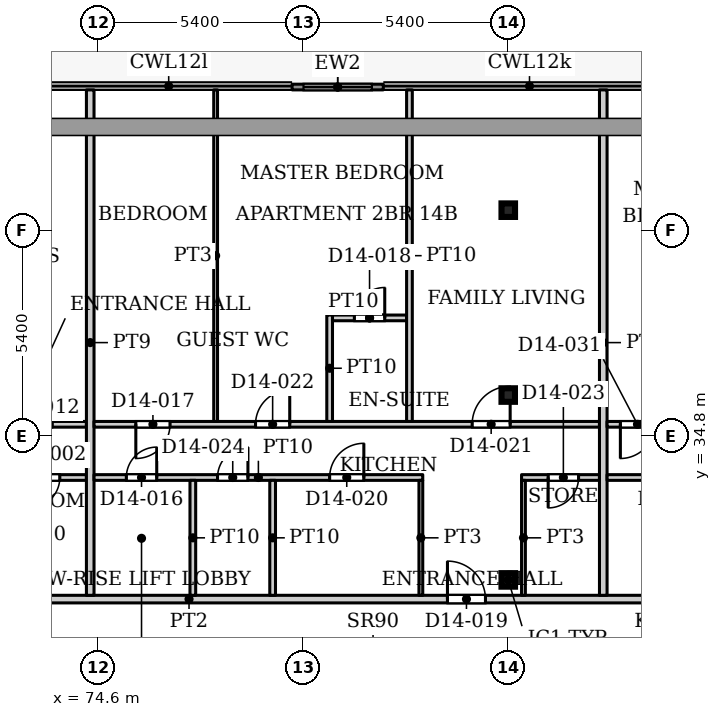
"""IFC4 building model, lengths in metres.
Left out: names, types, materials, properties, quantities, classifications, styles, units other than length and angle.
Written with IfcOpenShell. Run it as: python <this file> out.ifc"""

import sys

from ifc_helpers import new_model, si_unit, direction, frame, frame_2d, origin, origin_2d, place, context, subcontext, project, spatial, rectangle, hollow_rectangle, extrude, source, transform, mapped, element, fill, save


model = new_model("IFC4")
c1 = context("Model", 3, precision=1e-05, world=origin(), true_north=direction((0.0, 1.0)))
c2 = subcontext(c1, "Body", "Model", "MODEL_VIEW")
j1 = project(units=[si_unit("LENGTHUNIT", "METRE"), si_unit("PLANEANGLEUNIT", "RADIAN")], contexts=[c1])
p1 = place(None, origin())
s1 = spatial("IfcSite", under=j1, at=p1, CompositionType="ELEMENT")
p2 = place(p1, origin())
s2 = spatial("IfcBuilding", under=s1, at=p2, CompositionType="ELEMENT")
p3 = place(p2, frame((0.0, 0.0, 61.7)))
s3 = spatial("IfcBuildingStorey", under=s2, at=p3, CompositionType="ELEMENT", Elevation=61.7)
for number, where, z_axis, x_axis in (
    (1, (85.4, 31.005, 0.0), (0.0, 0.0, 1.0), (1.0, 0.0, 0.0)),
    (2, (85.4, 35.87, 0.0), (0.0, 0.0, 1.0), (1.0, 0.0, 0.0)),
    (3, (85.4, 40.735, 0.0), (0.0, 0.0, 1.0), (1.0, 0.0, 0.0)),
):
    element("IfcColumn", number, at=place(p3, frame(where, z_axis=z_axis, x_axis=x_axis)), inside=s3, PredefinedType="COLUMN", context=c2, shape_type="SweptSolid", body=[
        extrude(hollow_rectangle(XDim=0.356, YDim=0.356, WallThickness=0.016, InnerFilletRadius=0.016, OuterFilletRadius=0.032, at=origin_2d()), origin(), (0.0, 0.0, 1.0), 3.9),
    ])
p4 = place(p3, frame((79.712, 43.975, 0.0), z_axis=(0.0, 0.0, 1.0), x_axis=(1.0, 0.0, 0.0)))
e4 = element("IfcWall", 4, at=p4, inside=s3, PredefinedType="SOLIDWALL", context=c2, shape_type="SweptSolid", body=[
    extrude(rectangle(XDim=2.4, YDim=0.15, at=frame_2d((1.2, 0.0))), origin(), (0.0, 0.0, 1.0), 3.75),
])
p5 = place(p4, frame((0.3, 0.0, 0.0)))
e5 = element("IfcOpeningElement", 5, at=p5, cuts=e4, PredefinedType="OPENING", context=c2, shape_type="SweptSolid", body=[
    extrude(rectangle(XDim=1.8, YDim=2.4, at=frame_2d((0.9, 1.2))), frame((0.0, 0.085, 0.0), z_axis=(0.0, -1.0, 0.0), x_axis=(1.0, 0.0, 0.0)), (0.0, 0.0, 1.0), 0.17),
])
p6 = place(p3, frame((55.9, 30.5, 0.0), z_axis=(0.0, 0.0, 1.0), x_axis=(1.0, 0.0, 0.0)))
e6 = element("IfcWall", 6, at=p6, inside=s3, PredefinedType="PARTITIONING", context=c2, shape_type="SweptSolid", body=[
    extrude(rectangle(XDim=42.2, YDim=0.2, at=frame_2d((21.1, 0.0))), origin(), (0.0, 0.0, 1.0), 3.6),
])
p7 = place(p6, frame((14.7, 0.0, 0.0)))
e7 = element("IfcOpeningElement", 7, at=p7, cuts=e6, PredefinedType="OPENING", context=c2, shape_type="SweptSolid", body=[
    extrude(rectangle(XDim=1.0, YDim=2.1, at=frame_2d((0.5, 1.05))), frame((0.0, 0.11, 0.0), z_axis=(0.0, -1.0, 0.0), x_axis=(1.0, 0.0, 0.0)), (0.0, 0.0, 1.0), 0.22),
])
p8 = place(p6, frame((27.9, 0.0, 0.0)))
e8 = element("IfcOpeningElement", 8, at=p8, cuts=e6, PredefinedType="OPENING", context=c2, shape_type="SweptSolid", body=[
    extrude(rectangle(XDim=1.0, YDim=2.1, at=frame_2d((0.5, 1.05))), frame((0.0, 0.11, 0.0), z_axis=(0.0, -1.0, 0.0), x_axis=(1.0, 0.0, 0.0)), (0.0, 0.0, 1.0), 0.22),
])
p9 = place(p6, frame((39.0, 0.0, 0.0)))
e9 = element("IfcOpeningElement", 9, at=p9, cuts=e6, PredefinedType="OPENING", context=c2, shape_type="SweptSolid", body=[
    extrude(rectangle(XDim=1.0, YDim=2.1, at=frame_2d((0.5, 1.05))), frame((0.0, 0.11, 0.0), z_axis=(0.0, -1.0, 0.0), x_axis=(1.0, 0.0, 0.0)), (0.0, 0.0, 1.0), 0.22),
])
p10 = place(p3, frame((55.9, 35.1, 0.0), z_axis=(0.0, 0.0, 1.0), x_axis=(1.0, 0.0, 0.0)))
e10 = element("IfcWall", 10, at=p10, inside=s3, PredefinedType="PARTITIONING", context=c2, shape_type="SweptSolid", body=[
    extrude(rectangle(XDim=18.4, YDim=0.15, at=frame_2d((9.2, 0.0))), origin(), (0.0, 0.0, 1.0), 3.6),
])
p11 = place(p10, frame((1.25, 0.0, 0.0)))
e11 = element("IfcOpeningElement", 11, at=p11, cuts=e10, PredefinedType="OPENING", context=c2, shape_type="SweptSolid", body=[
    extrude(rectangle(XDim=0.9, YDim=2.1, at=frame_2d((0.45, 1.05))), frame((0.0, 0.085, 0.0), z_axis=(0.0, -1.0, 0.0), x_axis=(1.0, 0.0, 0.0)), (0.0, 0.0, 1.0), 0.17),
])
p12 = place(p10, frame((9.2, 0.0, 0.0)))
e12 = element("IfcOpeningElement", 12, at=p12, cuts=e10, PredefinedType="OPENING", context=c2, shape_type="SweptSolid", body=[
    extrude(rectangle(XDim=0.9, YDim=2.1, at=frame_2d((0.45, 1.05))), frame((0.0, 0.085, 0.0), z_axis=(0.0, -1.0, 0.0), x_axis=(1.0, 0.0, 0.0)), (0.0, 0.0, 1.0), 0.17),
])
p13 = place(p10, frame((12.35, 0.0, 0.0)))
e13 = element("IfcOpeningElement", 13, at=p13, cuts=e10, PredefinedType="OPENING", context=c2, shape_type="SweptSolid", body=[
    extrude(rectangle(XDim=1.0, YDim=2.1, at=frame_2d((0.5, 1.05))), frame((0.0, 0.085, 0.0), z_axis=(0.0, -1.0, 0.0), x_axis=(1.0, 0.0, 0.0)), (0.0, 0.0, 1.0), 0.17),
])
p14 = place(p10, frame((15.9, 0.0, 0.0)))
e14 = element("IfcOpeningElement", 14, at=p14, cuts=e10, PredefinedType="OPENING", context=c2, shape_type="SweptSolid", body=[
    extrude(rectangle(XDim=1.6, YDim=2.1, at=frame_2d((0.8, 1.05))), frame((0.0, 0.085, 0.0), z_axis=(0.0, -1.0, 0.0), x_axis=(1.0, 0.0, 0.0)), (0.0, 0.0, 1.0), 0.17),
])
p15 = place(p10, frame((4.4, 0.0, 0.0)))
e15 = element("IfcOpeningElement", 15, at=p15, cuts=e10, PredefinedType="OPENING", context=c2, shape_type="SweptSolid", body=[
    extrude(rectangle(XDim=0.9, YDim=2.1, at=frame_2d((0.45, 1.05))), frame((0.0, 0.085, 0.0), z_axis=(0.0, -1.0, 0.0), x_axis=(1.0, 0.0, 0.0)), (0.0, 0.0, 1.0), 0.17),
])
p16 = place(p3, frame((72.075, 33.7, 0.0), z_axis=(0.0, 0.0, 1.0), x_axis=(1.0, 0.0, 0.0)))
e16 = element("IfcWall", 16, at=p16, inside=s3, PredefinedType="PARTITIONING", context=c2, shape_type="SweptSolid", body=[
    extrude(rectangle(XDim=2.225, YDim=0.15, at=frame_2d((1.113, 0.0))), origin(), (0.0, 0.0, 1.0), 3.6),
])
p17 = place(p16, frame((0.725, 0.0, 0.0)))
e17 = element("IfcOpeningElement", 17, at=p17, cuts=e16, PredefinedType="OPENING", context=c2, shape_type="SweptSolid", body=[
    extrude(rectangle(XDim=0.8, YDim=2.1, at=frame_2d((0.4, 1.05))), frame((0.0, 0.085, 0.0), z_axis=(0.0, -1.0, 0.0), x_axis=(1.0, 0.0, 0.0)), (0.0, 0.0, 1.0), 0.17),
])
p18 = place(p3, frame((74.4, 30.6, 0.0), z_axis=(0.0, 0.0, 1.0), x_axis=(0.0, 1.0, 0.0)))
e18 = element("IfcWall", 18, at=p18, inside=s3, PredefinedType="PARTITIONING", context=c2, shape_type="SweptSolid", body=[
    extrude(rectangle(XDim=13.3, YDim=0.2, at=frame_2d((6.65, 0.0))), origin(), (0.0, 0.0, 1.0), 3.6),
])
p19 = place(p3, frame((74.5, 33.7, 0.0), z_axis=(0.0, 0.0, 1.0), x_axis=(1.0, 0.0, 0.0)))
e19 = element("IfcWall", 19, at=p19, inside=s3, PredefinedType="PARTITIONING", context=c2, shape_type="SweptSolid", body=[
    extrude(rectangle(XDim=8.65, YDim=0.15, at=frame_2d((4.325, 0.0))), origin(), (0.0, 0.0, 1.0), 3.6),
])
p20 = place(p19, frame((0.85, 0.0, 0.0)))
e20 = element("IfcOpeningElement", 20, at=p20, cuts=e19, PredefinedType="OPENING", context=c2, shape_type="SweptSolid", body=[
    extrude(rectangle(XDim=0.8, YDim=2.1, at=frame_2d((0.4, 1.05))), frame((0.0, 0.085, 0.0), z_axis=(0.0, -1.0, 0.0), x_axis=(1.0, 0.0, 0.0)), (0.0, 0.0, 1.0), 0.17),
])
p21 = place(p19, frame((6.2, 0.0, 0.0)))
e21 = element("IfcOpeningElement", 21, at=p21, cuts=e19, PredefinedType="OPENING", context=c2, shape_type="SweptSolid", body=[
    extrude(rectangle(XDim=0.9, YDim=2.1, at=frame_2d((0.45, 1.05))), frame((0.0, 0.085, 0.0), z_axis=(0.0, -1.0, 0.0), x_axis=(1.0, 0.0, 0.0)), (0.0, 0.0, 1.0), 0.17),
])
p22 = place(p19, frame((3.25, 0.0, 0.0)))
e22 = element("IfcOpeningElement", 22, at=p22, cuts=e19, PredefinedType="OPENING", context=c2, shape_type="SweptSolid", body=[
    extrude(rectangle(XDim=0.8, YDim=2.1, at=frame_2d((0.4, 1.05))), frame((0.0, 0.085, 0.0), z_axis=(0.0, -1.0, 0.0), x_axis=(1.0, 0.0, 0.0)), (0.0, 0.0, 1.0), 0.17),
])
p23 = place(p3, frame((74.5, 35.1, 0.0), z_axis=(0.0, 0.0, 1.0), x_axis=(1.0, 0.0, 0.0)))
e23 = element("IfcWall", 23, at=p23, inside=s3, PredefinedType="PARTITIONING", context=c2, shape_type="SweptSolid", body=[
    extrude(rectangle(XDim=13.3, YDim=0.15, at=frame_2d((6.65, 0.0))), origin(), (0.0, 0.0, 1.0), 3.6),
])
p24 = place(p23, frame((1.1, 0.0, 0.0)))
e24 = element("IfcOpeningElement", 24, at=p24, cuts=e23, PredefinedType="OPENING", context=c2, shape_type="SweptSolid", body=[
    extrude(rectangle(XDim=0.9, YDim=2.1, at=frame_2d((0.45, 1.05))), frame((0.0, 0.085, 0.0), z_axis=(0.0, -1.0, 0.0), x_axis=(1.0, 0.0, 0.0)), (0.0, 0.0, 1.0), 0.17),
])
p25 = place(p23, frame((9.95, 0.0, 0.0)))
e25 = element("IfcOpeningElement", 25, at=p25, cuts=e23, PredefinedType="OPENING", context=c2, shape_type="SweptSolid", body=[
    extrude(rectangle(XDim=1.0, YDim=2.1, at=frame_2d((0.5, 1.05))), frame((0.0, 0.085, 0.0), z_axis=(0.0, -1.0, 0.0), x_axis=(1.0, 0.0, 0.0)), (0.0, 0.0, 1.0), 0.17),
])
p26 = place(p23, frame((4.25, 0.0, 0.0)))
e26 = element("IfcOpeningElement", 26, at=p26, cuts=e23, PredefinedType="OPENING", context=c2, shape_type="SweptSolid", body=[
    extrude(rectangle(XDim=0.9, YDim=2.1, at=frame_2d((0.45, 1.05))), frame((0.0, 0.085, 0.0), z_axis=(0.0, -1.0, 0.0), x_axis=(1.0, 0.0, 0.0)), (0.0, 0.0, 1.0), 0.17),
])
p27 = place(p3, frame((77.1, 30.6, 0.0), z_axis=(0.0, 0.0, 1.0), x_axis=(0.0, 1.0, 0.0)))
e27 = element("IfcWall", 27, at=p27, inside=s3, PredefinedType="PARTITIONING", context=c2, shape_type="SweptSolid", body=[
    extrude(rectangle(XDim=3.025, YDim=0.15, at=frame_2d((1.512, 0.0))), origin(), (0.0, 0.0, 1.0), 3.6),
])
p28 = place(p3, frame((77.7, 35.175, 0.0), z_axis=(0.0, 0.0, 1.0), x_axis=(0.0, 1.0, 0.0)))
e28 = element("IfcWall", 28, at=p28, inside=s3, PredefinedType="PARTITIONING", context=c2, shape_type="SweptSolid", body=[
    extrude(rectangle(XDim=8.725, YDim=0.1, at=frame_2d((4.362, 0.0))), origin(), (0.0, 0.0, 1.0), 3.6),
])
p29 = place(p3, frame((79.2, 30.6, 0.0), z_axis=(0.0, 0.0, 1.0), x_axis=(0.0, 1.0, 0.0)))
e29 = element("IfcWall", 29, at=p29, inside=s3, PredefinedType="PARTITIONING", context=c2, shape_type="SweptSolid", body=[
    extrude(rectangle(XDim=3.025, YDim=0.15, at=frame_2d((1.512, 0.0))), origin(), (0.0, 0.0, 1.0), 3.6),
])
p30 = place(p3, frame((80.7, 35.175, 0.0), z_axis=(0.0, 0.0, 1.0), x_axis=(0.0, 1.0, 0.0)))
e30 = element("IfcWall", 30, at=p30, inside=s3, PredefinedType="PARTITIONING", context=c2, shape_type="SweptSolid", body=[
    extrude(rectangle(XDim=2.8, YDim=0.15, at=frame_2d((1.4, 0.0))), origin(), (0.0, 0.0, 1.0), 3.6),
])
p31 = place(p3, frame((80.775, 37.9, 0.0), z_axis=(0.0, 0.0, 1.0), x_axis=(1.0, 0.0, 0.0)))
e31 = element("IfcWall", 31, at=p31, inside=s3, PredefinedType="PARTITIONING", context=c2, shape_type="SweptSolid", body=[
    extrude(rectangle(XDim=1.95, YDim=0.15, at=frame_2d((0.975, 0.0))), origin(), (0.0, 0.0, 1.0), 3.6),
])
p32 = place(p31, frame((0.575, 0.0, 0.0)))
e32 = element("IfcOpeningElement", 32, at=p32, cuts=e31, PredefinedType="OPENING", context=c2, shape_type="SweptSolid", body=[
    extrude(rectangle(XDim=0.8, YDim=2.1, at=frame_2d((0.4, 1.05))), frame((0.0, 0.085, 0.0), z_axis=(0.0, -1.0, 0.0), x_axis=(1.0, 0.0, 0.0)), (0.0, 0.0, 1.0), 0.17),
])
p33 = place(p3, frame((82.8, 35.175, 0.0), z_axis=(0.0, 0.0, 1.0), x_axis=(0.0, 1.0, 0.0)))
e33 = element("IfcWall", 33, at=p33, inside=s3, PredefinedType="PARTITIONING", context=c2, shape_type="SweptSolid", body=[
    extrude(rectangle(XDim=8.725, YDim=0.15, at=frame_2d((4.362, 0.0))), origin(), (0.0, 0.0, 1.0), 3.6),
])
p34 = place(p3, frame((83.1, 30.6, 0.0), z_axis=(0.0, 0.0, 1.0), x_axis=(0.0, 1.0, 0.0)))
e34 = element("IfcWall", 34, at=p34, inside=s3, PredefinedType="PARTITIONING", context=c2, shape_type="SweptSolid", body=[
    extrude(rectangle(XDim=3.025, YDim=0.1, at=frame_2d((1.512, 0.0))), origin(), (0.0, 0.0, 1.0), 3.6),
])
p35 = place(p3, frame((85.75, 33.7, 0.0), z_axis=(0.0, 0.0, 1.0), x_axis=(1.0, 0.0, 0.0)))
e35 = element("IfcWall", 35, at=p35, inside=s3, PredefinedType="PARTITIONING", context=c2, shape_type="SweptSolid", body=[
    extrude(rectangle(XDim=2.05, YDim=0.15, at=frame_2d((1.025, 0.0))), origin(), (0.0, 0.0, 1.0), 3.6),
])
p36 = place(p35, frame((0.7, 0.0, 0.0)))
e36 = element("IfcOpeningElement", 36, at=p36, cuts=e35, PredefinedType="OPENING", context=c2, shape_type="SweptSolid", body=[
    extrude(rectangle(XDim=0.8, YDim=2.1, at=frame_2d((0.4, 1.05))), frame((0.0, 0.085, 0.0), z_axis=(0.0, -1.0, 0.0), x_axis=(1.0, 0.0, 0.0)), (0.0, 0.0, 1.0), 0.17),
])
p37 = place(p3, frame((85.8, 30.6, 0.0), z_axis=(0.0, 0.0, 1.0), x_axis=(0.0, 1.0, 0.0)))
e37 = element("IfcWall", 37, at=p37, inside=s3, PredefinedType="PARTITIONING", context=c2, shape_type="SweptSolid", body=[
    extrude(rectangle(XDim=3.025, YDim=0.1, at=frame_2d((1.512, 0.0))), origin(), (0.0, 0.0, 1.0), 3.6),
])
p38 = place(p3, frame((87.9, 30.6, 0.0), z_axis=(0.0, 0.0, 1.0), x_axis=(0.0, 1.0, 0.0)))
e38 = element("IfcWall", 38, at=p38, inside=s3, PredefinedType="PARTITIONING", context=c2, shape_type="SweptSolid", body=[
    extrude(rectangle(XDim=13.3, YDim=0.2, at=frame_2d((6.65, 0.0))), origin(), (0.0, 0.0, 1.0), 3.6),
])
p39 = place(p3, frame((88.0, 33.7, 0.0), z_axis=(0.0, 0.0, 1.0), x_axis=(1.0, 0.0, 0.0)))
e39 = element("IfcWall", 39, at=p39, inside=s3, PredefinedType="PARTITIONING", context=c2, shape_type="SweptSolid", body=[
    extrude(rectangle(XDim=6.275, YDim=0.15, at=frame_2d((3.137, 0.0))), origin(), (0.0, 0.0, 1.0), 3.6),
])
p40 = place(p39, frame((1.45, 0.0, 0.0)))
e40 = element("IfcOpeningElement", 40, at=p40, cuts=e39, PredefinedType="OPENING", context=c2, shape_type="SweptSolid", body=[
    extrude(rectangle(XDim=0.9, YDim=2.1, at=frame_2d((0.45, 1.05))), frame((0.0, 0.085, 0.0), z_axis=(0.0, -1.0, 0.0), x_axis=(1.0, 0.0, 0.0)), (0.0, 0.0, 1.0), 0.17),
])
p41 = place(p39, frame((4.75, 0.0, 0.0)))
e41 = element("IfcOpeningElement", 41, at=p41, cuts=e39, PredefinedType="OPENING", context=c2, shape_type="SweptSolid", body=[
    extrude(rectangle(XDim=0.8, YDim=2.1, at=frame_2d((0.4, 1.05))), frame((0.0, 0.085, 0.0), z_axis=(0.0, -1.0, 0.0), x_axis=(1.0, 0.0, 0.0)), (0.0, 0.0, 1.0), 0.17),
])
p42 = place(p3, frame((88.0, 35.1, 0.0), z_axis=(0.0, 0.0, 1.0), x_axis=(1.0, 0.0, 0.0)))
e42 = element("IfcWall", 42, at=p42, inside=s3, PredefinedType="PARTITIONING", context=c2, shape_type="SweptSolid", body=[
    extrude(rectangle(XDim=11.9, YDim=0.15, at=frame_2d((5.95, 0.0))), origin(), (0.0, 0.0, 1.0), 3.6),
])
p43 = place(p42, frame((9.65, 0.0, 0.0)))
e43 = element("IfcOpeningElement", 43, at=p43, cuts=e42, PredefinedType="OPENING", context=c2, shape_type="SweptSolid", body=[
    extrude(rectangle(XDim=0.9, YDim=2.1, at=frame_2d((0.45, 1.05))), frame((0.0, 0.085, 0.0), z_axis=(0.0, -1.0, 0.0), x_axis=(1.0, 0.0, 0.0)), (0.0, 0.0, 1.0), 0.17),
])
p44 = place(p42, frame((5.55, 0.0, 0.0)))
e44 = element("IfcOpeningElement", 44, at=p44, cuts=e42, PredefinedType="OPENING", context=c2, shape_type="SweptSolid", body=[
    extrude(rectangle(XDim=1.0, YDim=2.1, at=frame_2d((0.5, 1.05))), frame((0.0, 0.085, 0.0), z_axis=(0.0, -1.0, 0.0), x_axis=(1.0, 0.0, 0.0)), (0.0, 0.0, 1.0), 0.17),
])
p45 = place(p42, frame((0.35, 0.0, 0.0)))
e45 = element("IfcOpeningElement", 45, at=p45, cuts=e42, PredefinedType="OPENING", context=c2, shape_type="SweptSolid", body=[
    extrude(rectangle(XDim=0.9, YDim=2.1, at=frame_2d((0.45, 1.05))), frame((0.0, 0.085, 0.0), z_axis=(0.0, -1.0, 0.0), x_axis=(1.0, 0.0, 0.0)), (0.0, 0.0, 1.0), 0.17),
])
m1 = source(origin(), c2, "Body", "SweptSolid", [
    extrude(rectangle(XDim=1.8, YDim=2.4, at=frame_2d((0.9, 1.2))), frame((0.0, 0.025, 0.0), z_axis=(0.0, -1.0, 0.0), x_axis=(1.0, 0.0, 0.0)), (0.0, 0.0, 1.0), 0.05),
])
p46 = place(p5, origin())
e46 = element("IfcDoor", 46, at=p46, inside=s3, OperationType="SLIDING_TO_LEFT", PredefinedType="DOOR", context=c2, shape_type="MappedRepresentation", body=[
    mapped(m1, transform((0.0, 0.0, 0.0), x_axis=(1.0, 0.0, 0.0), y_axis=(0.0, 1.0, 0.0), z_axis=(0.0, 0.0, 1.0), scale=1.0)),
])
fill(e5, e46)
m2 = source(origin(), c2, "Body", "SweptSolid", [
    extrude(rectangle(XDim=0.8, YDim=2.1, at=frame_2d((0.4, 1.05))), frame((0.0, 0.025, 0.0), z_axis=(0.0, -1.0, 0.0), x_axis=(1.0, 0.0, 0.0)), (0.0, 0.0, 1.0), 0.05),
])
p47 = place(p17, origin())
e47 = element("IfcDoor", 47, at=p47, inside=s3, OperationType="SINGLE_SWING_RIGHT", PredefinedType="DOOR", context=c2, shape_type="MappedRepresentation", body=[
    mapped(m2, transform((0.0, 0.0, 0.0), x_axis=(1.0, 0.0, 0.0), y_axis=(0.0, 1.0, 0.0), z_axis=(0.0, 0.0, 1.0), scale=1.0)),
])
fill(e17, e47)
p48 = place(p20, origin())
e48 = element("IfcDoor", 48, at=p48, inside=s3, OperationType="SINGLE_SWING_LEFT", PredefinedType="DOOR", context=c2, shape_type="MappedRepresentation", body=[
    mapped(m2, transform((0.0, 0.0, 0.0), x_axis=(1.0, 0.0, 0.0), y_axis=(0.0, 1.0, 0.0), z_axis=(0.0, 0.0, 1.0), scale=1.0)),
])
fill(e20, e48)
m3 = source(origin(), c2, "Body", "SweptSolid", [
    extrude(rectangle(XDim=0.9, YDim=2.1, at=frame_2d((0.45, 1.05))), frame((0.0, 0.025, 0.0), z_axis=(0.0, -1.0, 0.0), x_axis=(1.0, 0.0, 0.0)), (0.0, 0.0, 1.0), 0.05),
])
p49 = place(p24, origin())
e49 = element("IfcDoor", 49, at=p49, inside=s3, OperationType="SINGLE_SWING_RIGHT", PredefinedType="DOOR", context=c2, shape_type="MappedRepresentation", body=[
    mapped(m3, transform((0.0, 0.0, 0.0), x_axis=(1.0, 0.0, 0.0), y_axis=(0.0, 1.0, 0.0), z_axis=(0.0, 0.0, 1.0), scale=1.0)),
])
fill(e24, e49)
p50 = place(p32, origin())
e50 = element("IfcDoor", 50, at=p50, inside=s3, OperationType="SINGLE_SWING_LEFT", PredefinedType="DOOR", context=c2, shape_type="MappedRepresentation", body=[
    mapped(m2, transform((0.0, 0.0, 0.0), x_axis=(1.0, 0.0, 0.0), y_axis=(0.0, 1.0, 0.0), z_axis=(0.0, 0.0, 1.0), scale=1.0)),
])
fill(e32, e50)
m4 = source(origin(), c2, "Body", "SweptSolid", [
    extrude(rectangle(XDim=1.0, YDim=2.1, at=frame_2d((0.5, 1.05))), frame((0.0, 0.025, 0.0), z_axis=(0.0, -1.0, 0.0), x_axis=(1.0, 0.0, 0.0)), (0.0, 0.0, 1.0), 0.05),
])
p51 = place(p8, origin())
e51 = element("IfcDoor", 51, at=p51, inside=s3, OperationType="SINGLE_SWING_LEFT", PredefinedType="DOOR", context=c2, shape_type="MappedRepresentation", body=[
    mapped(m4, transform((0.0, 0.0, 0.0), x_axis=(1.0, 0.0, 0.0), y_axis=(0.0, 1.0, 0.0), z_axis=(0.0, 0.0, 1.0), scale=1.0)),
])
fill(e8, e51)
p52 = place(p21, origin())
e52 = element("IfcDoor", 52, at=p52, inside=s3, OperationType="SINGLE_SWING_LEFT", PredefinedType="DOOR", context=c2, shape_type="MappedRepresentation", body=[
    mapped(m3, transform((0.0, 0.0, 0.0), x_axis=(1.0, 0.0, 0.0), y_axis=(0.0, 1.0, 0.0), z_axis=(0.0, 0.0, 1.0), scale=1.0)),
])
fill(e21, e52)
m5 = source(origin(), c2, "Body", "SweptSolid", [
    extrude(rectangle(XDim=1.0, YDim=2.1, at=frame_2d((0.5, 1.05))), frame((0.0, 0.025, 0.0), z_axis=(0.0, -1.0, 0.0), x_axis=(1.0, 0.0, 0.0)), (0.0, 0.0, 1.0), 0.05),
])
p53 = place(p25, origin())
e53 = element("IfcDoor", 53, at=p53, inside=s3, OperationType="SINGLE_SWING_LEFT", PredefinedType="DOOR", context=c2, shape_type="MappedRepresentation", body=[
    mapped(m5, transform((0.0, 0.0, 0.0), x_axis=(1.0, 0.0, 0.0), y_axis=(0.0, 1.0, 0.0), z_axis=(0.0, 0.0, 1.0), scale=1.0)),
])
fill(e25, e53)
p54 = place(p26, origin())
e54 = element("IfcDoor", 54, at=p54, inside=s3, OperationType="SINGLE_SWING_LEFT", PredefinedType="DOOR", context=c2, shape_type="MappedRepresentation", body=[
    mapped(m3, transform((0.0, 0.0, 0.0), x_axis=(1.0, 0.0, 0.0), y_axis=(0.0, 1.0, 0.0), z_axis=(0.0, 0.0, 1.0), scale=1.0)),
])
fill(e26, e54)
p55 = place(p36, origin())
e55 = element("IfcDoor", 55, at=p55, inside=s3, OperationType="SINGLE_SWING_RIGHT", PredefinedType="DOOR", context=c2, shape_type="MappedRepresentation", body=[
    mapped(m2, transform((0.0, 0.0, 0.0), x_axis=(1.0, 0.0, 0.0), y_axis=(0.0, 1.0, 0.0), z_axis=(0.0, 0.0, 1.0), scale=1.0)),
])
fill(e36, e55)
p56 = place(p22, origin())
e56 = element("IfcDoor", 56, at=p56, inside=s3, OperationType="SINGLE_SWING_LEFT", PredefinedType="DOOR", context=c2, shape_type="MappedRepresentation", body=[
    mapped(m2, transform((0.0, 0.0, 0.0), x_axis=(1.0, 0.0, 0.0), y_axis=(0.0, 1.0, 0.0), z_axis=(0.0, 0.0, 1.0), scale=1.0)),
])
fill(e22, e56)
p57 = place(p45, origin())
e57 = element("IfcDoor", 57, at=p57, inside=s3, OperationType="SINGLE_SWING_RIGHT", PredefinedType="DOOR", context=c2, shape_type="MappedRepresentation", body=[
    mapped(m3, transform((0.0, 0.0, 0.0), x_axis=(1.0, 0.0, 0.0), y_axis=(0.0, 1.0, 0.0), z_axis=(0.0, 0.0, 1.0), scale=1.0)),
])
fill(e45, e57)
save(model, sys.argv[1])
